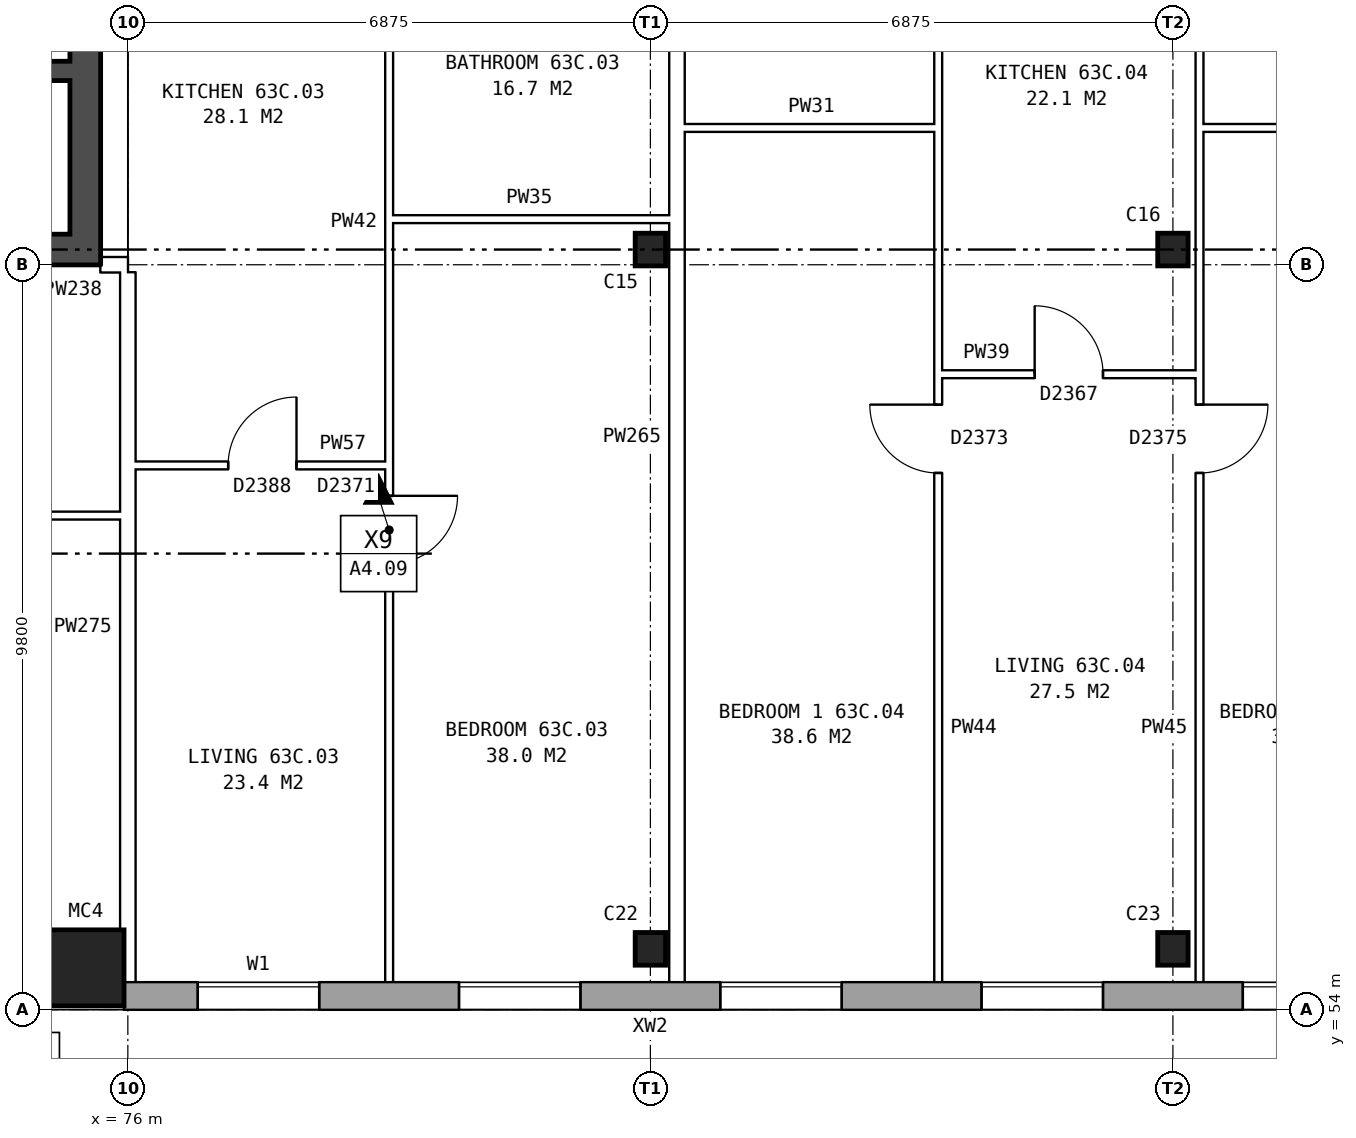
"""IFC4 building model, lengths in metres.
Left out: names, types, materials, properties, quantities, classifications, styles, units other than length and angle.
Written with IfcOpenShell. Run it as: python <this file> out.ifc"""

import sys

from ifc_helpers import new_model, si_unit, direction, frame, frame_2d, origin, origin_2d, place, context, subcontext, project, spatial, rectangle, hollow_rectangle, i_section, extrude, element, fill, save


model = new_model("IFC4")
c1 = context("Model", 3, precision=1e-05, world=origin(), true_north=direction((0.0, 1.0)))
c2 = subcontext(c1, "Body", "Model", "MODEL_VIEW")
j1 = project(units=[si_unit("LENGTHUNIT", "METRE"), si_unit("PLANEANGLEUNIT", "RADIAN")], contexts=[c1])
p1 = place(None, origin())
s1 = spatial("IfcSite", under=j1, at=p1, CompositionType="ELEMENT")
p2 = place(p1, origin())
s2 = spatial("IfcBuilding", under=s1, at=p2, CompositionType="ELEMENT")
p3 = place(p2, frame((0.0, 0.0, 224.5)))
s3 = spatial("IfcBuildingStorey", under=s2, at=p3, CompositionType="ELEMENT", Elevation=224.5)
p4 = place(p3, frame((75.45, 54.55, 0.0), z_axis=(0.0, 0.0, 1.0), x_axis=(1.0, 0.0, 0.0)))
e1 = element("IfcColumn", 1, at=p4, inside=s3, PredefinedType="COLUMN", context=c2, shape_type="SweptSolid", body=[
    extrude(hollow_rectangle(XDim=1.0, YDim=1.0, WallThickness=0.055, at=origin_2d()), origin(), (0.0, 0.0, 1.0), 3.1),
])
for number, where, z_axis, x_axis in (
    (2, (82.875, 54.8, 0.0), (0.0, 0.0, 1.0), (1.0, 0.0, 0.0)),
    (3, (89.75, 54.8, 0.0), (0.0, 0.0, 1.0), (1.0, 0.0, 0.0)),
    (4, (82.875, 64.0, 0.0), (0.0, 0.0, 1.0), (1.0, 0.0, 0.0)),
    (5, (89.75, 64.0, 0.0), (0.0, 0.0, 1.0), (1.0, 0.0, 0.0)),
):
    element("IfcColumn", number, at=place(p3, frame(where, z_axis=z_axis, x_axis=x_axis)), inside=s3, PredefinedType="COLUMN", context=c2, shape_type="SweptSolid", body=[
        extrude(i_section(OverallWidth=0.4, OverallDepth=0.43, WebThickness=0.04, FlangeThickness=0.04, at=origin_2d()), origin(), (0.0, 0.0, 1.0), 2.85),
    ])
p5 = place(p3, frame((75.95, 54.18, 0.0), z_axis=(0.0, 0.0, 1.0), x_axis=(1.0, 0.0, 0.0)))
e6 = element("IfcWall", 6, at=p5, inside=s3, PredefinedType="STANDARD", context=c2, shape_type="SweptSolid", body=[
    extrude(rectangle(XDim=55.1, YDim=0.36, at=frame_2d((27.55, 0.0))), origin(), (0.0, 0.0, 1.0), 2.85),
])
p6 = place(p5, frame((0.969, 0.0, 0.8)))
e7 = element("IfcOpeningElement", 7, at=p6, cuts=e6, PredefinedType="OPENING", context=c2, shape_type="SweptSolid", body=[
    extrude(rectangle(XDim=1.6, YDim=1.8, at=frame_2d((0.8, 0.9))), frame((0.0, 0.19, 0.0), z_axis=(0.0, -1.0, 0.0), x_axis=(1.0, 0.0, 0.0)), (0.0, 0.0, 1.0), 0.38),
])
p7 = place(p5, frame((4.406, 0.0, 0.8)))
e8 = element("IfcOpeningElement", 8, at=p7, cuts=e6, PredefinedType="OPENING", context=c2, shape_type="SweptSolid", body=[
    extrude(rectangle(XDim=1.6, YDim=1.8, at=frame_2d((0.8, 0.9))), frame((0.0, 0.19, 0.0), z_axis=(0.0, -1.0, 0.0), x_axis=(1.0, 0.0, 0.0)), (0.0, 0.0, 1.0), 0.38),
])
p8 = place(p5, frame((7.844, 0.0, 0.8)))
e9 = element("IfcOpeningElement", 9, at=p8, cuts=e6, PredefinedType="OPENING", context=c2, shape_type="SweptSolid", body=[
    extrude(rectangle(XDim=1.6, YDim=1.8, at=frame_2d((0.8, 0.9))), frame((0.0, 0.19, 0.0), z_axis=(0.0, -1.0, 0.0), x_axis=(1.0, 0.0, 0.0)), (0.0, 0.0, 1.0), 0.38),
])
p9 = place(p5, frame((11.281, 0.0, 0.8)))
e10 = element("IfcOpeningElement", 10, at=p9, cuts=e6, PredefinedType="OPENING", context=c2, shape_type="SweptSolid", body=[
    extrude(rectangle(XDim=1.6, YDim=1.8, at=frame_2d((0.8, 0.9))), frame((0.0, 0.19, 0.0), z_axis=(0.0, -1.0, 0.0), x_axis=(1.0, 0.0, 0.0)), (0.0, 0.0, 1.0), 0.38),
])
p10 = place(p5, frame((14.719, 0.0, 0.8)))
e11 = element("IfcOpeningElement", 11, at=p10, cuts=e6, PredefinedType="OPENING", context=c2, shape_type="SweptSolid", body=[
    extrude(rectangle(XDim=1.6, YDim=1.8, at=frame_2d((0.8, 0.9))), frame((0.0, 0.19, 0.0), z_axis=(0.0, -1.0, 0.0), x_axis=(1.0, 0.0, 0.0)), (0.0, 0.0, 1.0), 0.38),
])
p11 = place(p5, frame((18.156, 0.0, 0.8)))
e12 = element("IfcOpeningElement", 12, at=p11, cuts=e6, PredefinedType="OPENING", context=c2, shape_type="SweptSolid", body=[
    extrude(rectangle(XDim=1.6, YDim=1.8, at=frame_2d((0.8, 0.9))), frame((0.0, 0.19, 0.0), z_axis=(0.0, -1.0, 0.0), x_axis=(1.0, 0.0, 0.0)), (0.0, 0.0, 1.0), 0.38),
])
p12 = place(p5, frame((21.594, 0.0, 0.8)))
e13 = element("IfcOpeningElement", 13, at=p12, cuts=e6, PredefinedType="OPENING", context=c2, shape_type="SweptSolid", body=[
    extrude(rectangle(XDim=1.6, YDim=1.8, at=frame_2d((0.8, 0.9))), frame((0.0, 0.19, 0.0), z_axis=(0.0, -1.0, 0.0), x_axis=(1.0, 0.0, 0.0)), (0.0, 0.0, 1.0), 0.38),
])
p13 = place(p5, frame((25.031, 0.0, 0.8)))
e14 = element("IfcOpeningElement", 14, at=p13, cuts=e6, PredefinedType="OPENING", context=c2, shape_type="SweptSolid", body=[
    extrude(rectangle(XDim=1.6, YDim=1.8, at=frame_2d((0.8, 0.9))), frame((0.0, 0.19, 0.0), z_axis=(0.0, -1.0, 0.0), x_axis=(1.0, 0.0, 0.0)), (0.0, 0.0, 1.0), 0.38),
])
p14 = place(p5, frame((28.469, 0.0, 0.8)))
e15 = element("IfcOpeningElement", 15, at=p14, cuts=e6, PredefinedType="OPENING", context=c2, shape_type="SweptSolid", body=[
    extrude(rectangle(XDim=1.6, YDim=1.8, at=frame_2d((0.8, 0.9))), frame((0.0, 0.19, 0.0), z_axis=(0.0, -1.0, 0.0), x_axis=(1.0, 0.0, 0.0)), (0.0, 0.0, 1.0), 0.38),
])
p15 = place(p5, frame((31.906, 0.0, 0.8)))
e16 = element("IfcOpeningElement", 16, at=p15, cuts=e6, PredefinedType="OPENING", context=c2, shape_type="SweptSolid", body=[
    extrude(rectangle(XDim=1.6, YDim=1.8, at=frame_2d((0.8, 0.9))), frame((0.0, 0.19, 0.0), z_axis=(0.0, -1.0, 0.0), x_axis=(1.0, 0.0, 0.0)), (0.0, 0.0, 1.0), 0.38),
])
p16 = place(p5, frame((35.344, 0.0, 0.8)))
e17 = element("IfcOpeningElement", 17, at=p16, cuts=e6, PredefinedType="OPENING", context=c2, shape_type="SweptSolid", body=[
    extrude(rectangle(XDim=1.6, YDim=1.8, at=frame_2d((0.8, 0.9))), frame((0.0, 0.19, 0.0), z_axis=(0.0, -1.0, 0.0), x_axis=(1.0, 0.0, 0.0)), (0.0, 0.0, 1.0), 0.38),
])
p17 = place(p5, frame((38.781, 0.0, 0.8)))
e18 = element("IfcOpeningElement", 18, at=p17, cuts=e6, PredefinedType="OPENING", context=c2, shape_type="SweptSolid", body=[
    extrude(rectangle(XDim=1.6, YDim=1.8, at=frame_2d((0.8, 0.9))), frame((0.0, 0.19, 0.0), z_axis=(0.0, -1.0, 0.0), x_axis=(1.0, 0.0, 0.0)), (0.0, 0.0, 1.0), 0.38),
])
p18 = place(p5, frame((42.219, 0.0, 0.8)))
e19 = element("IfcOpeningElement", 19, at=p18, cuts=e6, PredefinedType="OPENING", context=c2, shape_type="SweptSolid", body=[
    extrude(rectangle(XDim=1.6, YDim=1.8, at=frame_2d((0.8, 0.9))), frame((0.0, 0.19, 0.0), z_axis=(0.0, -1.0, 0.0), x_axis=(1.0, 0.0, 0.0)), (0.0, 0.0, 1.0), 0.38),
])
p19 = place(p5, frame((45.656, 0.0, 0.8)))
e20 = element("IfcOpeningElement", 20, at=p19, cuts=e6, PredefinedType="OPENING", context=c2, shape_type="SweptSolid", body=[
    extrude(rectangle(XDim=1.6, YDim=1.8, at=frame_2d((0.8, 0.9))), frame((0.0, 0.19, 0.0), z_axis=(0.0, -1.0, 0.0), x_axis=(1.0, 0.0, 0.0)), (0.0, 0.0, 1.0), 0.38),
])
p20 = place(p5, frame((49.094, 0.0, 0.8)))
e21 = element("IfcOpeningElement", 21, at=p20, cuts=e6, PredefinedType="OPENING", context=c2, shape_type="SweptSolid", body=[
    extrude(rectangle(XDim=1.6, YDim=1.8, at=frame_2d((0.8, 0.9))), frame((0.0, 0.19, 0.0), z_axis=(0.0, -1.0, 0.0), x_axis=(1.0, 0.0, 0.0)), (0.0, 0.0, 1.0), 0.38),
])
p21 = place(p5, frame((52.531, 0.0, 0.8)))
e22 = element("IfcOpeningElement", 22, at=p21, cuts=e6, PredefinedType="OPENING", context=c2, shape_type="SweptSolid", body=[
    extrude(rectangle(XDim=1.6, YDim=1.8, at=frame_2d((0.8, 0.9))), frame((0.0, 0.19, 0.0), z_axis=(0.0, -1.0, 0.0), x_axis=(1.0, 0.0, 0.0)), (0.0, 0.0, 1.0), 0.38),
])
p22 = place(p3, frame((75.44, 63.8, 0.0), z_axis=(0.0, 0.0, 1.0), x_axis=(0.0, 1.0, 0.0)))
e23 = element("IfcWall", 23, at=p22, inside=s3, PredefinedType="SHEAR", context=c2, shape_type="SweptSolid", body=[
    extrude(rectangle(XDim=12.4, YDim=0.4, at=frame_2d((6.2, 0.0))), origin(), (0.0, 0.0, 1.0), 2.85),
])
p23 = place(p22, frame((9.8, 0.0, 0.0)))
e24 = element("IfcOpeningElement", 24, at=p23, cuts=e23, PredefinedType="OPENING", context=c2, shape_type="SweptSolid", body=[
    extrude(rectangle(XDim=1.1, YDim=2.1, at=frame_2d((0.55, 1.05))), frame((0.0, 0.21, 0.0), z_axis=(0.0, -1.0, 0.0), x_axis=(1.0, 0.0, 0.0)), (0.0, 0.0, 1.0), 0.42),
])
p24 = place(p3, frame((67.04, 64.0, 0.0), z_axis=(0.0, 0.0, 1.0), x_axis=(1.0, 0.0, 0.0)))
e25 = element("IfcWall", 25, at=p24, inside=s3, PredefinedType="SHEAR", context=c2, shape_type="SweptSolid", body=[
    extrude(rectangle(XDim=8.2, YDim=0.4, at=frame_2d((4.1, 0.0))), origin(), (0.0, 0.0, 1.0), 2.85),
])
p25 = place(p3, frame((72.165, 66.35, 0.0), z_axis=(0.0, 0.0, 1.0), x_axis=(1.0, 0.0, 0.0)))
e26 = element("IfcWall", 26, at=p25, inside=s3, PredefinedType="SHEAR", context=c2, shape_type="SweptSolid", body=[
    extrude(rectangle(XDim=3.075, YDim=0.25, at=frame_2d((1.538, 0.0))), origin(), (0.0, 0.0, 1.0), 2.85),
])
p26 = place(p3, frame((70.1, 60.5, 0.0), z_axis=(0.0, 0.0, 1.0), x_axis=(1.0, 0.0, 0.0)))
e27 = element("IfcWall", 27, at=p26, inside=s3, PredefinedType="PARTITIONING", context=c2, shape_type="SweptSolid", body=[
    extrude(rectangle(XDim=5.8, YDim=0.1, at=frame_2d((2.9, 0.0))), origin(), (0.0, 0.0, 1.0), 2.85),
])
p27 = place(p3, frame((76.1, 61.16, 0.0), z_axis=(0.0, 0.0, 1.0), x_axis=(1.0, 0.0, 0.0)))
e28 = element("IfcWall", 28, at=p27, inside=s3, PredefinedType="PARTITIONING", context=c2, shape_type="SweptSolid", body=[
    extrude(rectangle(XDim=3.338, YDim=0.1, at=frame_2d((1.669, 0.0))), origin(), (0.0, 0.0, 1.0), 2.85),
])
p28 = place(p27, frame((1.219, 0.0, 0.0)))
e29 = element("IfcOpeningElement", 29, at=p28, cuts=e28, PredefinedType="OPENING", context=c2, shape_type="SweptSolid", body=[
    extrude(rectangle(XDim=0.9, YDim=2.1, at=frame_2d((0.45, 1.05))), frame((0.0, 0.06, 0.0), z_axis=(0.0, -1.0, 0.0), x_axis=(1.0, 0.0, 0.0)), (0.0, 0.0, 1.0), 0.12),
])
p29 = place(p3, frame((86.662, 62.36, 0.0), z_axis=(0.0, 0.0, 1.0), x_axis=(1.0, 0.0, 0.0)))
e30 = element("IfcWall", 30, at=p29, inside=s3, PredefinedType="PARTITIONING", context=c2, shape_type="SweptSolid", body=[
    extrude(rectangle(XDim=3.438, YDim=0.1, at=frame_2d((1.719, 0.0))), origin(), (0.0, 0.0, 1.0), 2.85),
])
p30 = place(p29, frame((1.269, 0.0, 0.0)))
e31 = element("IfcOpeningElement", 31, at=p30, cuts=e30, PredefinedType="OPENING", context=c2, shape_type="SweptSolid", body=[
    extrude(rectangle(XDim=0.9, YDim=2.1, at=frame_2d((0.45, 1.05))), frame((0.0, 0.06, 0.0), z_axis=(0.0, -1.0, 0.0), x_axis=(1.0, 0.0, 0.0)), (0.0, 0.0, 1.0), 0.12),
])
p31 = place(p3, frame((75.64, 63.8, 0.0), z_axis=(0.0, 0.0, 1.0), x_axis=(1.0, 0.0, 0.0)))
e32 = element("IfcWall", 32, at=p31, inside=s3, PredefinedType="PARTITIONING", context=c2, shape_type="SweptSolid", body=[
    extrude(rectangle(XDim=0.36, YDim=0.2, at=frame_2d((0.18, 0.0))), origin(), (0.0, 0.0, 1.0), 2.85),
])
p32 = place(p3, frame((79.438, 64.4, 0.0), z_axis=(0.0, 0.0, 1.0), x_axis=(1.0, 0.0, 0.0)))
e33 = element("IfcWall", 33, at=p32, inside=s3, PredefinedType="PARTITIONING", context=c2, shape_type="SweptSolid", body=[
    extrude(rectangle(XDim=3.687, YDim=0.1, at=frame_2d((1.844, 0.0))), origin(), (0.0, 0.0, 1.0), 2.85),
])
p33 = place(p3, frame((83.325, 65.6, 0.0), z_axis=(0.0, 0.0, 1.0), x_axis=(1.0, 0.0, 0.0)))
e34 = element("IfcWall", 34, at=p33, inside=s3, PredefinedType="PARTITIONING", context=c2, shape_type="SweptSolid", body=[
    extrude(rectangle(XDim=3.337, YDim=0.1, at=frame_2d((1.668, 0.0))), origin(), (0.0, 0.0, 1.0), 2.85),
])
p34 = place(p3, frame((90.1, 65.6, 0.0), z_axis=(0.0, 0.0, 1.0), x_axis=(1.0, 0.0, 0.0)))
e35 = element("IfcWall", 35, at=p34, inside=s3, PredefinedType="PARTITIONING", context=c2, shape_type="SweptSolid", body=[
    extrude(rectangle(XDim=6.875, YDim=0.1, at=frame_2d((3.438, 0.0))), origin(), (0.0, 0.0, 1.0), 2.85),
])
p35 = place(p3, frame((76.0, 54.36, 0.0), z_axis=(0.0, 0.0, 1.0), x_axis=(0.0, 1.0, 0.0)))
e36 = element("IfcWall", 36, at=p35, inside=s3, PredefinedType="PARTITIONING", context=c2, shape_type="SweptSolid", body=[
    extrude(rectangle(XDim=9.34, YDim=0.2, at=frame_2d((4.67, 0.0))), origin(), (0.0, 0.0, 1.0), 2.85),
])
p36 = place(p3, frame((79.438, 54.36, 0.0), z_axis=(0.0, 0.0, 1.0), x_axis=(0.0, 1.0, 0.0)))
e37 = element("IfcWall", 37, at=p36, inside=s3, PredefinedType="PARTITIONING", context=c2, shape_type="SweptSolid", body=[
    extrude(rectangle(XDim=14.34, YDim=0.1, at=frame_2d((7.17, 0.0))), origin(), (0.0, 0.0, 1.0), 2.85),
])
p37 = place(p36, frame((5.5, 0.0, 0.0)))
e38 = element("IfcOpeningElement", 38, at=p37, cuts=e37, PredefinedType="OPENING", context=c2, shape_type="SweptSolid", body=[
    extrude(rectangle(XDim=0.9, YDim=2.1, at=frame_2d((0.45, 1.05))), frame((0.0, 0.06, 0.0), z_axis=(0.0, -1.0, 0.0), x_axis=(1.0, 0.0, 0.0)), (0.0, 0.0, 1.0), 0.12),
])
p38 = place(p36, frame((13.04, 0.0, 0.0)))
e39 = element("IfcOpeningElement", 39, at=p38, cuts=e37, PredefinedType="OPENING", context=c2, shape_type="SweptSolid", body=[
    extrude(rectangle(XDim=0.9, YDim=2.1, at=frame_2d((0.45, 1.05))), frame((0.0, 0.06, 0.0), z_axis=(0.0, -1.0, 0.0), x_axis=(1.0, 0.0, 0.0)), (0.0, 0.0, 1.0), 0.12),
])
p39 = place(p3, frame((83.225, 54.36, 0.0), z_axis=(0.0, 0.0, 1.0), x_axis=(0.0, 1.0, 0.0)))
e40 = element("IfcWall", 40, at=p39, inside=s3, PredefinedType="PARTITIONING", context=c2, shape_type="SweptSolid", body=[
    extrude(rectangle(XDim=14.34, YDim=0.2, at=frame_2d((7.17, 0.0))), origin(), (0.0, 0.0, 1.0), 2.85),
])
p40 = place(p3, frame((86.662, 54.36, 0.0), z_axis=(0.0, 0.0, 1.0), x_axis=(0.0, 1.0, 0.0)))
e41 = element("IfcWall", 41, at=p40, inside=s3, PredefinedType="PARTITIONING", context=c2, shape_type="SweptSolid", body=[
    extrude(rectangle(XDim=14.34, YDim=0.1, at=frame_2d((7.17, 0.0))), origin(), (0.0, 0.0, 1.0), 2.85),
])
p41 = place(p40, frame((6.7, 0.0, 0.0)))
e42 = element("IfcOpeningElement", 42, at=p41, cuts=e41, PredefinedType="OPENING", context=c2, shape_type="SweptSolid", body=[
    extrude(rectangle(XDim=0.9, YDim=2.1, at=frame_2d((0.45, 1.05))), frame((0.0, 0.06, 0.0), z_axis=(0.0, -1.0, 0.0), x_axis=(1.0, 0.0, 0.0)), (0.0, 0.0, 1.0), 0.12),
])
p42 = place(p40, frame((13.04, 0.0, 0.0)))
e43 = element("IfcOpeningElement", 43, at=p42, cuts=e41, PredefinedType="OPENING", context=c2, shape_type="SweptSolid", body=[
    extrude(rectangle(XDim=0.9, YDim=2.1, at=frame_2d((0.45, 1.05))), frame((0.0, 0.06, 0.0), z_axis=(0.0, -1.0, 0.0), x_axis=(1.0, 0.0, 0.0)), (0.0, 0.0, 1.0), 0.12),
])
p43 = place(p3, frame((90.1, 54.36, 0.0), z_axis=(0.0, 0.0, 1.0), x_axis=(0.0, 1.0, 0.0)))
e44 = element("IfcWall", 44, at=p43, inside=s3, PredefinedType="PARTITIONING", context=c2, shape_type="SweptSolid", body=[
    extrude(rectangle(XDim=14.34, YDim=0.1, at=frame_2d((7.17, 0.0))), origin(), (0.0, 0.0, 1.0), 2.85),
])
p44 = place(p43, frame((6.7, 0.0, 0.0)))
e45 = element("IfcOpeningElement", 45, at=p44, cuts=e44, PredefinedType="OPENING", context=c2, shape_type="SweptSolid", body=[
    extrude(rectangle(XDim=0.9, YDim=2.1, at=frame_2d((0.45, 1.05))), frame((0.0, 0.06, 0.0), z_axis=(0.0, -1.0, 0.0), x_axis=(1.0, 0.0, 0.0)), (0.0, 0.0, 1.0), 0.12),
])
p45 = place(p43, frame((13.04, 0.0, 0.0)))
e46 = element("IfcOpeningElement", 46, at=p45, cuts=e44, PredefinedType="OPENING", context=c2, shape_type="SweptSolid", body=[
    extrude(rectangle(XDim=0.9, YDim=2.1, at=frame_2d((0.45, 1.05))), frame((0.0, 0.06, 0.0), z_axis=(0.0, -1.0, 0.0), x_axis=(1.0, 0.0, 0.0)), (0.0, 0.0, 1.0), 0.12),
])
p46 = place(p6, origin())
e47 = element("IfcWindow", 47, at=p46, inside=s3, PartitioningType="SINGLE_PANEL", PredefinedType="WINDOW", context=c2, shape_type="SweptSolid", body=[
    extrude(rectangle(XDim=1.6, YDim=1.8, at=frame_2d((0.8, 0.9))), frame((0.0, 0.15, 0.0), z_axis=(0.0, -1.0, 0.0), x_axis=(1.0, 0.0, 0.0)), (0.0, 0.0, 1.0), 0.06),
])
fill(e7, e47)
p47 = place(p7, origin())
e48 = element("IfcWindow", 48, at=p47, inside=s3, PartitioningType="SINGLE_PANEL", PredefinedType="WINDOW", context=c2, shape_type="SweptSolid", body=[
    extrude(rectangle(XDim=1.6, YDim=1.8, at=frame_2d((0.8, 0.9))), frame((0.0, 0.15, 0.0), z_axis=(0.0, -1.0, 0.0), x_axis=(1.0, 0.0, 0.0)), (0.0, 0.0, 1.0), 0.06),
])
fill(e8, e48)
p48 = place(p8, origin())
e49 = element("IfcWindow", 49, at=p48, inside=s3, PartitioningType="SINGLE_PANEL", PredefinedType="WINDOW", context=c2, shape_type="SweptSolid", body=[
    extrude(rectangle(XDim=1.6, YDim=1.8, at=frame_2d((0.8, 0.9))), frame((0.0, 0.15, 0.0), z_axis=(0.0, -1.0, 0.0), x_axis=(1.0, 0.0, 0.0)), (0.0, 0.0, 1.0), 0.06),
])
fill(e9, e49)
p49 = place(p9, origin())
e50 = element("IfcWindow", 50, at=p49, inside=s3, PartitioningType="SINGLE_PANEL", PredefinedType="WINDOW", context=c2, shape_type="SweptSolid", body=[
    extrude(rectangle(XDim=1.6, YDim=1.8, at=frame_2d((0.8, 0.9))), frame((0.0, 0.15, 0.0), z_axis=(0.0, -1.0, 0.0), x_axis=(1.0, 0.0, 0.0)), (0.0, 0.0, 1.0), 0.06),
])
fill(e10, e50)
p50 = place(p10, origin())
e51 = element("IfcWindow", 51, at=p50, inside=s3, PartitioningType="SINGLE_PANEL", PredefinedType="WINDOW", context=c2, shape_type="SweptSolid", body=[
    extrude(rectangle(XDim=1.6, YDim=1.8, at=frame_2d((0.8, 0.9))), frame((0.0, 0.15, 0.0), z_axis=(0.0, -1.0, 0.0), x_axis=(1.0, 0.0, 0.0)), (0.0, 0.0, 1.0), 0.06),
])
fill(e11, e51)
p51 = place(p37, frame((0.9, 0.0, 0.0), z_axis=(0.0, 0.0, 1.0), x_axis=(-1.0, 0.0, 0.0)))
e52 = element("IfcDoor", 52, at=p51, inside=s3, OperationType="SINGLE_SWING_LEFT", PredefinedType="DOOR", context=c2, shape_type="SweptSolid", body=[
    extrude(rectangle(XDim=0.9, YDim=2.1, at=frame_2d((0.45, 1.05))), frame((0.0, 0.025, 0.0), z_axis=(0.0, -1.0, 0.0), x_axis=(1.0, 0.0, 0.0)), (0.0, 0.0, 1.0), 0.05),
])
fill(e38, e52)
p52 = place(p28, origin())
e53 = element("IfcDoor", 53, at=p52, inside=s3, OperationType="SINGLE_SWING_RIGHT", PredefinedType="DOOR", context=c2, shape_type="SweptSolid", body=[
    extrude(rectangle(XDim=0.9, YDim=2.1, at=frame_2d((0.45, 1.05))), frame((0.0, 0.025, 0.0), z_axis=(0.0, -1.0, 0.0), x_axis=(1.0, 0.0, 0.0)), (0.0, 0.0, 1.0), 0.05),
])
fill(e29, e53)
p53 = place(p41, origin())
e54 = element("IfcDoor", 54, at=p53, inside=s3, OperationType="SINGLE_SWING_RIGHT", PredefinedType="DOOR", context=c2, shape_type="SweptSolid", body=[
    extrude(rectangle(XDim=0.9, YDim=2.1, at=frame_2d((0.45, 1.05))), frame((0.0, 0.025, 0.0), z_axis=(0.0, -1.0, 0.0), x_axis=(1.0, 0.0, 0.0)), (0.0, 0.0, 1.0), 0.05),
])
fill(e42, e54)
p54 = place(p44, frame((0.9, 0.0, 0.0), z_axis=(0.0, 0.0, 1.0), x_axis=(-1.0, 0.0, 0.0)))
e55 = element("IfcDoor", 55, at=p54, inside=s3, OperationType="SINGLE_SWING_LEFT", PredefinedType="DOOR", context=c2, shape_type="SweptSolid", body=[
    extrude(rectangle(XDim=0.9, YDim=2.1, at=frame_2d((0.45, 1.05))), frame((0.0, 0.025, 0.0), z_axis=(0.0, -1.0, 0.0), x_axis=(1.0, 0.0, 0.0)), (0.0, 0.0, 1.0), 0.05),
])
fill(e45, e55)
p55 = place(p30, origin())
e56 = element("IfcDoor", 56, at=p55, inside=s3, OperationType="SINGLE_SWING_LEFT", PredefinedType="DOOR", context=c2, shape_type="SweptSolid", body=[
    extrude(rectangle(XDim=0.9, YDim=2.1, at=frame_2d((0.45, 1.05))), frame((0.0, 0.025, 0.0), z_axis=(0.0, -1.0, 0.0), x_axis=(1.0, 0.0, 0.0)), (0.0, 0.0, 1.0), 0.05),
])
fill(e31, e56)
save(model, sys.argv[1])
